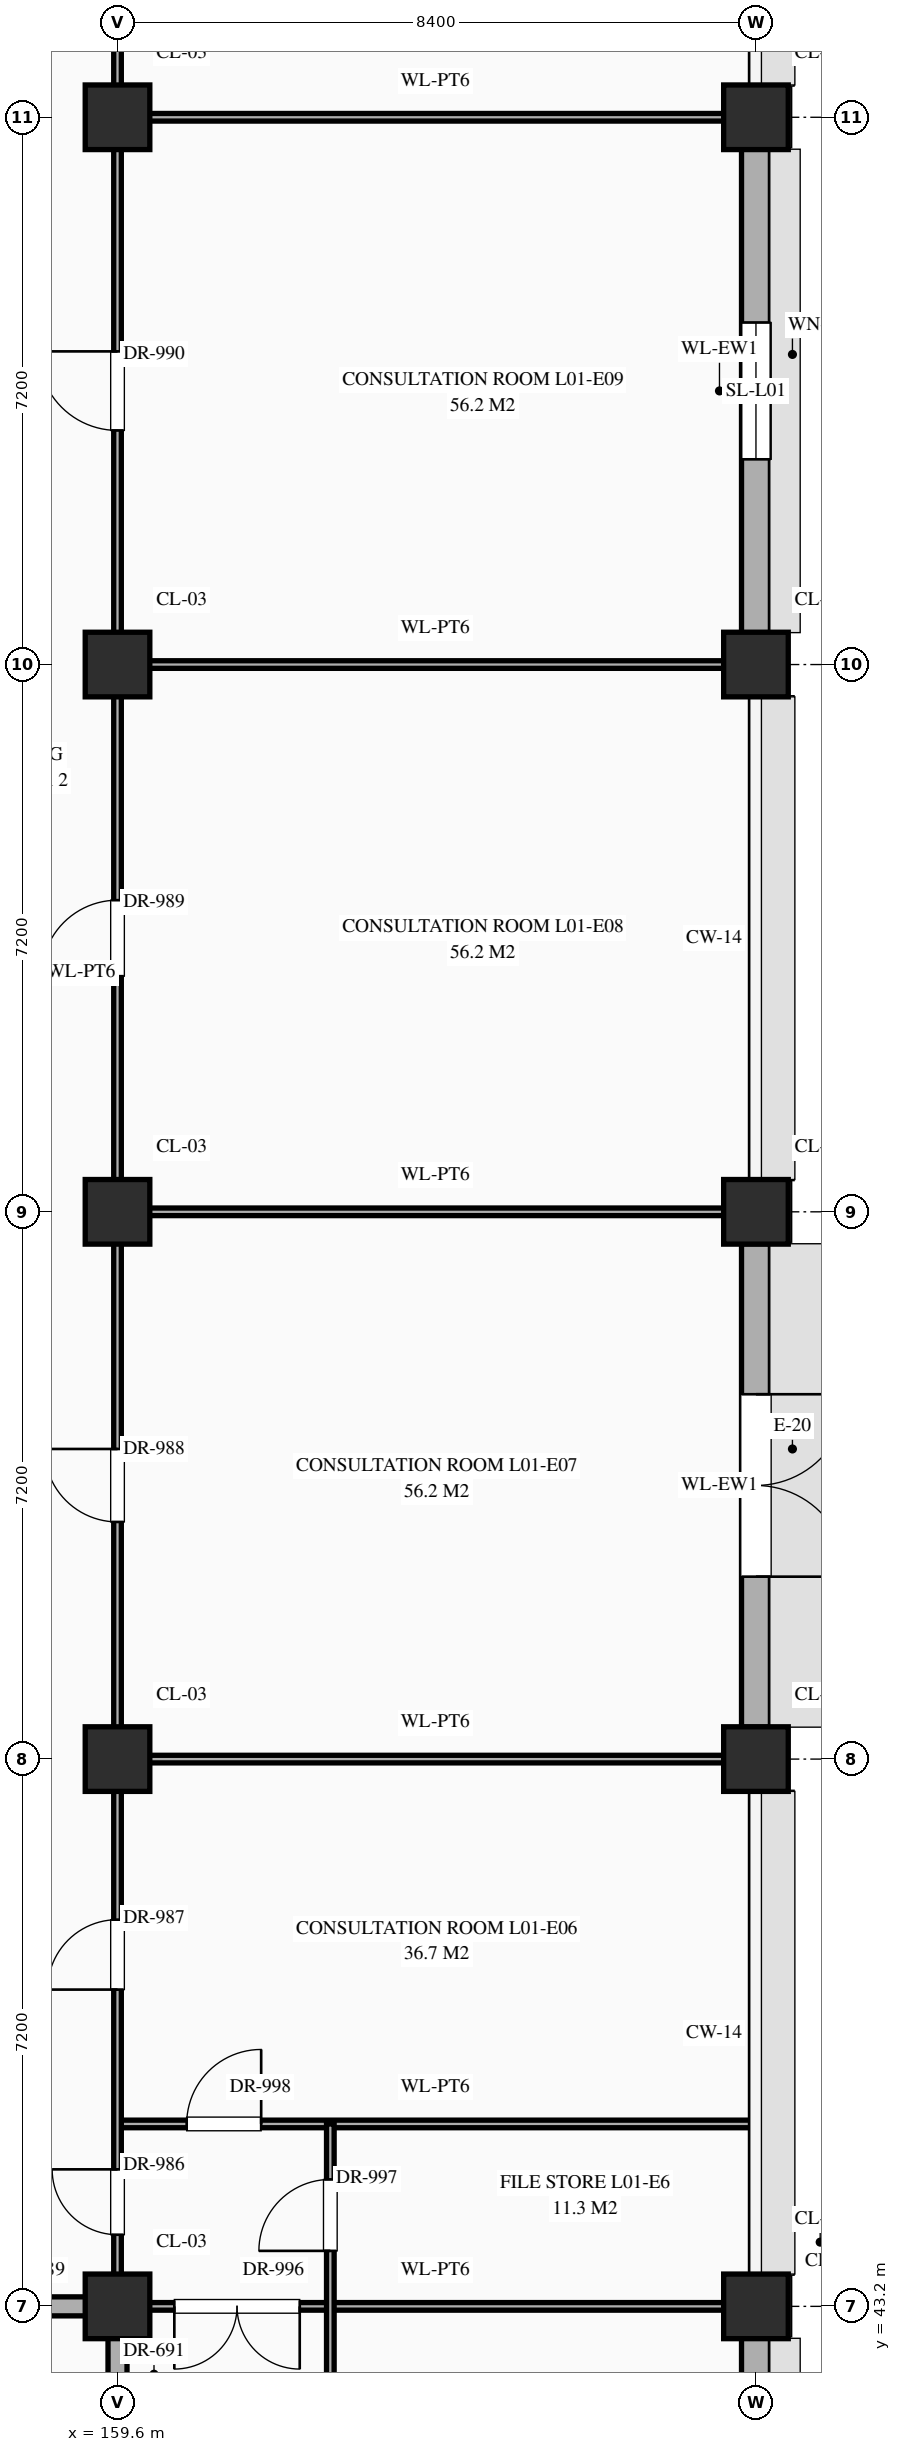
"""IFC4 building model, lengths in metres.
Left out: names, types, materials, properties, quantities, classifications, styles, units other than length and angle.
Written with IfcOpenShell. Run it as: python <this file> out.ifc"""

import sys

from ifc_helpers import new_model, si_unit, direction, frame, frame_2d, origin, origin_2d, place, context, subcontext, project, spatial, rectangle, extrude, element, fill, save


model = new_model("IFC4")
c1 = context("Model", 3, precision=1e-05, world=origin(), true_north=direction((0.0, 1.0)))
c2 = subcontext(c1, "Body", "Model", "MODEL_VIEW")
j1 = project(units=[si_unit("LENGTHUNIT", "METRE"), si_unit("PLANEANGLEUNIT", "RADIAN")], contexts=[c1])
p1 = place(None, origin())
s1 = spatial("IfcSite", under=j1, at=p1, CompositionType="ELEMENT")
p2 = place(p1, origin())
s2 = spatial("IfcBuilding", under=s1, at=p2, CompositionType="ELEMENT")
p3 = place(p2, origin())
s3 = spatial("IfcBuildingStorey", under=s2, at=p3, CompositionType="ELEMENT", Elevation=0.0)
for number, where, z_axis, x_axis in (
    (1, (159.6, 43.2, 0.0), (0.0, 0.0, 1.0), (1.0, 0.0, 0.0)),
    (2, (159.6, 50.4, 0.0), (0.0, 0.0, 1.0), (1.0, 0.0, 0.0)),
    (3, (159.6, 57.6, 0.0), (0.0, 0.0, 1.0), (1.0, 0.0, 0.0)),
    (4, (159.6, 64.8, 0.0), (0.0, 0.0, 1.0), (1.0, 0.0, 0.0)),
    (5, (159.6, 72.0, 0.0), (0.0, 0.0, 1.0), (1.0, 0.0, 0.0)),
    (6, (168.0, 43.2, 0.0), (0.0, 0.0, 1.0), (1.0, 0.0, 0.0)),
    (7, (168.0, 50.4, 0.0), (0.0, 0.0, 1.0), (1.0, 0.0, 0.0)),
    (8, (168.0, 57.6, 0.0), (0.0, 0.0, 1.0), (1.0, 0.0, 0.0)),
    (9, (168.0, 64.8, 0.0), (0.0, 0.0, 1.0), (1.0, 0.0, 0.0)),
    (10, (168.0, 72.0, 0.0), (0.0, 0.0, 1.0), (1.0, 0.0, 0.0)),
):
    element("IfcColumn", number, at=place(p3, frame(where, z_axis=z_axis, x_axis=x_axis)), inside=s3, PredefinedType="COLUMN", context=c2, shape_type="SweptSolid", body=[
        extrude(rectangle(XDim=0.85, YDim=0.85, at=origin_2d()), origin(), (0.0, 0.0, 1.0), 5.4),
    ])
p4 = place(p3, frame((168.0, 36.42, 0.0), z_axis=(0.0, 0.0, 1.0), x_axis=(0.0, 1.0, 0.0)))
e11 = element("IfcWall", 11, at=p4, inside=s3, PredefinedType="STANDARD", context=c2, shape_type="SweptSolid", body=[
    extrude(rectangle(XDim=6.36, YDim=0.38, at=frame_2d((3.18, 0.0))), origin(), (0.0, 0.0, 1.0), 4.47),
])
p5 = place(p4, frame((2.28, 0.0, 0.85)))
e12 = element("IfcOpeningElement", 12, at=p5, cuts=e11, PredefinedType="OPENING", context=c2, shape_type="SweptSolid", body=[
    extrude(rectangle(XDim=1.8, YDim=1.2, at=frame_2d((0.9, 0.6))), frame((0.0, 0.202, 0.0), z_axis=(0.0, -1.0, 0.0), x_axis=(1.0, 0.0, 0.0)), (0.0, 0.0, 1.0), 0.404),
])
p6 = place(p3, frame((168.0, 50.82, 0.0), z_axis=(0.0, 0.0, 1.0), x_axis=(0.0, 1.0, 0.0)))
e13 = element("IfcWall", 13, at=p6, inside=s3, PredefinedType="STANDARD", context=c2, shape_type="SweptSolid", body=[
    extrude(rectangle(XDim=6.36, YDim=0.38, at=frame_2d((3.18, 0.0))), origin(), (0.0, 0.0, 1.0), 4.47),
])
p7 = place(p6, frame((1.98, 0.0, 0.0)))
e14 = element("IfcOpeningElement", 14, at=p7, cuts=e13, PredefinedType="OPENING", context=c2, shape_type="SweptSolid", body=[
    extrude(rectangle(XDim=2.4, YDim=2.4, at=frame_2d((1.2, 1.2))), frame((0.0, 0.202, 0.0), z_axis=(0.0, -1.0, 0.0), x_axis=(1.0, 0.0, 0.0)), (0.0, 0.0, 1.0), 0.404),
])
p8 = place(p3, frame((168.0, 65.22, 0.0), z_axis=(0.0, 0.0, 1.0), x_axis=(0.0, 1.0, 0.0)))
e15 = element("IfcWall", 15, at=p8, inside=s3, PredefinedType="STANDARD", context=c2, shape_type="SweptSolid", body=[
    extrude(rectangle(XDim=6.36, YDim=0.38, at=frame_2d((3.18, 0.0))), origin(), (0.0, 0.0, 1.0), 4.47),
])
p9 = place(p8, frame((2.28, 0.0, 0.85)))
e16 = element("IfcOpeningElement", 16, at=p9, cuts=e15, PredefinedType="OPENING", context=c2, shape_type="SweptSolid", body=[
    extrude(rectangle(XDim=1.8, YDim=1.92, at=frame_2d((0.9, 0.96))), frame((0.0, 0.202, 0.0), z_axis=(0.0, -1.0, 0.0), x_axis=(1.0, 0.0, 0.0)), (0.0, 0.0, 1.0), 0.404),
])
p10 = place(p3, frame((151.24, 43.2, 0.0), z_axis=(0.0, 0.0, 1.0), x_axis=(1.0, 0.0, 0.0)))
e17 = element("IfcWall", 17, at=p10, inside=s3, PredefinedType="STANDARD", context=c2, shape_type="SweptSolid", body=[
    extrude(rectangle(XDim=8.36, YDim=0.25, at=frame_2d((4.18, 0.0))), origin(), (0.0, 0.0, 1.0), 4.27),
])
p11 = place(p10, frame((6.238, 0.0, 0.0)))
e18 = element("IfcOpeningElement", 18, at=p11, cuts=e17, PredefinedType="OPENING", context=c2, shape_type="SweptSolid", body=[
    extrude(rectangle(XDim=1.1, YDim=2.2, at=frame_2d((0.55, 1.1))), frame((0.0, 0.137, 0.0), z_axis=(0.0, -1.0, 0.0), x_axis=(1.0, 0.0, 0.0)), (0.0, 0.0, 1.0), 0.274),
])
p12 = place(p10, frame((1.933, 0.0, 0.0)))
e19 = element("IfcOpeningElement", 19, at=p12, cuts=e17, PredefinedType="OPENING", context=c2, shape_type="SweptSolid", body=[
    extrude(rectangle(XDim=2.0, YDim=2.4, at=frame_2d((1.0, 1.2))), frame((0.0, 0.137, 0.0), z_axis=(0.0, -1.0, 0.0), x_axis=(1.0, 0.0, 0.0)), (0.0, 0.0, 1.0), 0.274),
])
p13 = place(p3, frame((159.6, 43.2, 0.0), z_axis=(0.0, 0.0, 1.0), x_axis=(1.0, 0.0, 0.0)))
e20 = element("IfcWall", 20, at=p13, inside=s3, PredefinedType="STANDARD", context=c2, shape_type="SweptSolid", body=[
    extrude(rectangle(XDim=8.36, YDim=0.1, at=frame_2d((4.18, 0.0))), origin(), (0.0, 0.0, 1.0), 4.27),
])
p14 = place(p13, frame((0.748, 0.0, 0.0)))
e21 = element("IfcOpeningElement", 21, at=p14, cuts=e20, PredefinedType="OPENING", context=c2, shape_type="SweptSolid", body=[
    extrude(rectangle(XDim=1.65, YDim=2.4, at=frame_2d((0.825, 1.2))), frame((0.0, 0.062, 0.0), z_axis=(0.0, -1.0, 0.0), x_axis=(1.0, 0.0, 0.0)), (0.0, 0.0, 1.0), 0.124),
])
p15 = place(p3, frame((159.6, 45.6, 0.0), z_axis=(0.0, 0.0, 1.0), x_axis=(1.0, 0.0, 0.0)))
e22 = element("IfcWall", 22, at=p15, inside=s3, PredefinedType="STANDARD", context=c2, shape_type="SweptSolid", body=[
    extrude(rectangle(XDim=8.36, YDim=0.1, at=frame_2d((4.18, 0.0))), origin(), (0.0, 0.0, 1.0), 5.12),
])
p16 = place(p15, frame((0.91, 0.0, 0.0)))
e23 = element("IfcOpeningElement", 23, at=p16, cuts=e22, PredefinedType="OPENING", context=c2, shape_type="SweptSolid", body=[
    extrude(rectangle(XDim=0.98, YDim=2.35, at=frame_2d((0.49, 1.175))), frame((0.0, 0.062, 0.0), z_axis=(0.0, -1.0, 0.0), x_axis=(1.0, 0.0, 0.0)), (0.0, 0.0, 1.0), 0.124),
])
for number, where, z_axis, x_axis in (
    (24, (159.6, 50.4, 0.0), (0.0, 0.0, 1.0), (1.0, 0.0, 0.0)),
    (25, (159.6, 57.6, 0.0), (0.0, 0.0, 1.0), (1.0, 0.0, 0.0)),
    (26, (159.6, 64.8, 0.0), (0.0, 0.0, 1.0), (1.0, 0.0, 0.0)),
    (27, (159.6, 72.0, 0.0), (0.0, 0.0, 1.0), (1.0, 0.0, 0.0)),
):
    element("IfcWall", number, at=place(p3, frame(where, z_axis=z_axis, x_axis=x_axis)), inside=s3, PredefinedType="STANDARD", context=c2, shape_type="SweptSolid", body=[
        extrude(rectangle(XDim=8.36, YDim=0.1, at=frame_2d((4.18, 0.0))), origin(), (0.0, 0.0, 1.0), 4.27),
    ])
p17 = place(p3, frame((159.6, 40.8, 0.0), z_axis=(0.0, 0.0, 1.0), x_axis=(0.0, 1.0, 0.0)))
e28 = element("IfcWall", 28, at=p17, inside=s3, PredefinedType="STANDARD", context=c2, shape_type="SweptSolid", body=[
    extrude(rectangle(XDim=2.4, YDim=0.25, at=frame_2d((1.2, 0.0))), origin(), (0.0, 0.0, 1.0), 4.37),
])
p18 = place(p17, frame((0.552, 0.0, 0.0)))
e29 = element("IfcOpeningElement", 29, at=p18, cuts=e28, PredefinedType="OPENING", context=c2, shape_type="SweptSolid", body=[
    extrude(rectangle(XDim=0.95, YDim=2.15, at=frame_2d((0.475, 1.075))), frame((0.0, 0.137, 0.0), z_axis=(0.0, -1.0, 0.0), x_axis=(1.0, 0.0, 0.0)), (0.0, 0.0, 1.0), 0.274),
])
p19 = place(p3, frame((159.6, 43.2, 0.0), z_axis=(0.0, 0.0, 1.0), x_axis=(0.0, 1.0, 0.0)))
e30 = element("IfcWall", 30, at=p19, inside=s3, PredefinedType="STANDARD", context=c2, shape_type="SweptSolid", body=[
    extrude(rectangle(XDim=40.8, YDim=0.1, at=frame_2d((20.4, 0.0))), origin(), (0.0, 0.0, 1.0), 4.37),
])
p20 = place(p19, frame((37.933, 0.0, 0.0)))
e31 = element("IfcOpeningElement", 31, at=p20, cuts=e30, PredefinedType="OPENING", context=c2, shape_type="SweptSolid", body=[
    extrude(rectangle(XDim=1.28, YDim=2.35, at=frame_2d((0.64, 1.175))), frame((0.0, 0.062, 0.0), z_axis=(0.0, -1.0, 0.0), x_axis=(1.0, 0.0, 0.0)), (0.0, 0.0, 1.0), 0.124),
])
p21 = place(p19, frame((0.942, 0.0, 0.0)))
e32 = element("IfcOpeningElement", 32, at=p21, cuts=e30, PredefinedType="OPENING", context=c2, shape_type="SweptSolid", body=[
    extrude(rectangle(XDim=0.86, YDim=2.1, at=frame_2d((0.43, 1.05))), frame((0.0, 0.062, 0.0), z_axis=(0.0, -1.0, 0.0), x_axis=(1.0, 0.0, 0.0)), (0.0, 0.0, 1.0), 0.124),
])
p22 = place(p19, frame((4.167, 0.0, 0.0)))
e33 = element("IfcOpeningElement", 33, at=p22, cuts=e30, PredefinedType="OPENING", context=c2, shape_type="SweptSolid", body=[
    extrude(rectangle(XDim=0.92, YDim=2.15, at=frame_2d((0.46, 1.075))), frame((0.0, 0.062, 0.0), z_axis=(0.0, -1.0, 0.0), x_axis=(1.0, 0.0, 0.0)), (0.0, 0.0, 1.0), 0.124),
])
p23 = place(p19, frame((10.32, 0.0, 0.0)))
e34 = element("IfcOpeningElement", 34, at=p23, cuts=e30, PredefinedType="OPENING", context=c2, shape_type="SweptSolid", body=[
    extrude(rectangle(XDim=0.96, YDim=2.2, at=frame_2d((0.48, 1.1))), frame((0.0, 0.062, 0.0), z_axis=(0.0, -1.0, 0.0), x_axis=(1.0, 0.0, 0.0)), (0.0, 0.0, 1.0), 0.124),
])
p24 = place(p19, frame((17.5, 0.0, 0.0)))
e35 = element("IfcOpeningElement", 35, at=p24, cuts=e30, PredefinedType="OPENING", context=c2, shape_type="SweptSolid", body=[
    extrude(rectangle(XDim=1.0, YDim=2.25, at=frame_2d((0.5, 1.125))), frame((0.0, 0.062, 0.0), z_axis=(0.0, -1.0, 0.0), x_axis=(1.0, 0.0, 0.0)), (0.0, 0.0, 1.0), 0.124),
])
p25 = place(p19, frame((24.68, 0.0, 0.0)))
e36 = element("IfcOpeningElement", 36, at=p25, cuts=e30, PredefinedType="OPENING", context=c2, shape_type="SweptSolid", body=[
    extrude(rectangle(XDim=1.04, YDim=2.2, at=frame_2d((0.52, 1.1))), frame((0.0, 0.062, 0.0), z_axis=(0.0, -1.0, 0.0), x_axis=(1.0, 0.0, 0.0)), (0.0, 0.0, 1.0), 0.124),
])
p26 = place(p19, frame((31.86, 0.0, 0.0)))
e37 = element("IfcOpeningElement", 37, at=p26, cuts=e30, PredefinedType="OPENING", context=c2, shape_type="SweptSolid", body=[
    extrude(rectangle(XDim=1.08, YDim=2.25, at=frame_2d((0.54, 1.125))), frame((0.0, 0.062, 0.0), z_axis=(0.0, -1.0, 0.0), x_axis=(1.0, 0.0, 0.0)), (0.0, 0.0, 1.0), 0.124),
])
p27 = place(p3, frame((162.4, 33.6, 0.0), z_axis=(0.0, 0.0, 1.0), x_axis=(0.0, 1.0, 0.0)))
e38 = element("IfcWall", 38, at=p27, inside=s3, PredefinedType="STANDARD", context=c2, shape_type="SweptSolid", body=[
    extrude(rectangle(XDim=12.0, YDim=0.1, at=frame_2d((6.0, 0.0))), origin(), (0.0, 0.0, 1.0), 5.12),
])
p28 = place(p27, frame((0.62, 0.0, 0.0)))
e39 = element("IfcOpeningElement", 39, at=p28, cuts=e38, PredefinedType="OPENING", context=c2, shape_type="SweptSolid", body=[
    extrude(rectangle(XDim=1.16, YDim=2.3, at=frame_2d((0.58, 1.15))), frame((0.0, 0.062, 0.0), z_axis=(0.0, -1.0, 0.0), x_axis=(1.0, 0.0, 0.0)), (0.0, 0.0, 1.0), 0.124),
])
p29 = place(p27, frame((5.38, 0.0, 0.0)))
e40 = element("IfcOpeningElement", 40, at=p29, cuts=e38, PredefinedType="OPENING", context=c2, shape_type="SweptSolid", body=[
    extrude(rectangle(XDim=1.24, YDim=2.3, at=frame_2d((0.62, 1.15))), frame((0.0, 0.062, 0.0), z_axis=(0.0, -1.0, 0.0), x_axis=(1.0, 0.0, 0.0)), (0.0, 0.0, 1.0), 0.124),
])
p30 = place(p27, frame((10.33, 0.0, 0.0)))
e41 = element("IfcOpeningElement", 41, at=p30, cuts=e38, PredefinedType="OPENING", context=c2, shape_type="SweptSolid", body=[
    extrude(rectangle(XDim=0.94, YDim=2.3, at=frame_2d((0.47, 1.15))), frame((0.0, 0.062, 0.0), z_axis=(0.0, -1.0, 0.0), x_axis=(1.0, 0.0, 0.0)), (0.0, 0.0, 1.0), 0.124),
])
p31 = place(p7, frame((2.4, 0.0, 0.0), z_axis=(0.0, 0.0, 1.0), x_axis=(-1.0, 0.0, 0.0)))
e42 = element("IfcDoor", 42, at=p31, inside=s3, OperationType="DOUBLE_DOOR_SINGLE_SWING", PredefinedType="DOOR", context=c2, shape_type="SweptSolid", body=[
    extrude(rectangle(XDim=2.4, YDim=2.4, at=frame_2d((1.2, 1.2))), frame((0.0, 0.025, 0.0), z_axis=(0.0, -1.0, 0.0), x_axis=(1.0, 0.0, 0.0)), (0.0, 0.0, 1.0), 0.05),
])
fill(e14, e42)
p32 = place(p9, origin())
e43 = element("IfcWindow", 43, at=p32, inside=s3, PartitioningType="SINGLE_PANEL", PredefinedType="WINDOW", context=c2, shape_type="SweptSolid", body=[
    extrude(rectangle(XDim=1.8, YDim=1.92, at=frame_2d((0.9, 0.96))), frame((0.0, 0.03, 0.0), z_axis=(0.0, -1.0, 0.0), x_axis=(1.0, 0.0, 0.0)), (0.0, 0.0, 1.0), 0.06),
])
fill(e16, e43)
p33 = place(p21, origin())
e44 = element("IfcDoor", 44, at=p33, inside=s3, OperationType="SINGLE_SWING_RIGHT", PredefinedType="DOOR", context=c2, shape_type="SweptSolid", body=[
    extrude(rectangle(XDim=0.86, YDim=2.1, at=frame_2d((0.43, 1.05))), frame((0.0, 0.025, 0.0), z_axis=(0.0, -1.0, 0.0), x_axis=(1.0, 0.0, 0.0)), (0.0, 0.0, 1.0), 0.05),
])
fill(e32, e44)
p34 = place(p22, origin())
e45 = element("IfcDoor", 45, at=p34, inside=s3, OperationType="SINGLE_SWING_LEFT", PredefinedType="DOOR", context=c2, shape_type="SweptSolid", body=[
    extrude(rectangle(XDim=0.92, YDim=2.15, at=frame_2d((0.46, 1.075))), frame((0.0, 0.025, 0.0), z_axis=(0.0, -1.0, 0.0), x_axis=(1.0, 0.0, 0.0)), (0.0, 0.0, 1.0), 0.05),
])
fill(e33, e45)
p35 = place(p23, origin())
e46 = element("IfcDoor", 46, at=p35, inside=s3, OperationType="SINGLE_SWING_RIGHT", PredefinedType="DOOR", context=c2, shape_type="SweptSolid", body=[
    extrude(rectangle(XDim=0.96, YDim=2.2, at=frame_2d((0.48, 1.1))), frame((0.0, 0.025, 0.0), z_axis=(0.0, -1.0, 0.0), x_axis=(1.0, 0.0, 0.0)), (0.0, 0.0, 1.0), 0.05),
])
fill(e34, e46)
p36 = place(p24, origin())
e47 = element("IfcDoor", 47, at=p36, inside=s3, OperationType="SINGLE_SWING_LEFT", PredefinedType="DOOR", context=c2, shape_type="SweptSolid", body=[
    extrude(rectangle(XDim=1.0, YDim=2.25, at=frame_2d((0.5, 1.125))), frame((0.0, 0.025, 0.0), z_axis=(0.0, -1.0, 0.0), x_axis=(1.0, 0.0, 0.0)), (0.0, 0.0, 1.0), 0.05),
])
fill(e35, e47)
p37 = place(p25, origin())
e48 = element("IfcDoor", 48, at=p37, inside=s3, OperationType="SINGLE_SWING_RIGHT", PredefinedType="DOOR", context=c2, shape_type="SweptSolid", body=[
    extrude(rectangle(XDim=1.04, YDim=2.2, at=frame_2d((0.52, 1.1))), frame((0.0, 0.025, 0.0), z_axis=(0.0, -1.0, 0.0), x_axis=(1.0, 0.0, 0.0)), (0.0, 0.0, 1.0), 0.05),
])
fill(e36, e48)
p38 = place(p14, frame((1.65, 0.0, 0.0), z_axis=(0.0, 0.0, 1.0), x_axis=(-1.0, 0.0, 0.0)))
e49 = element("IfcDoor", 49, at=p38, inside=s3, OperationType="DOUBLE_DOOR_SINGLE_SWING", PredefinedType="DOOR", context=c2, shape_type="SweptSolid", body=[
    extrude(rectangle(XDim=1.65, YDim=2.4, at=frame_2d((0.825, 1.2))), frame((0.0, 0.025, 0.0), z_axis=(0.0, -1.0, 0.0), x_axis=(1.0, 0.0, 0.0)), (0.0, 0.0, 1.0), 0.05),
])
fill(e21, e49)
p39 = place(p30, origin())
e50 = element("IfcDoor", 50, at=p39, inside=s3, OperationType="SINGLE_SWING_LEFT", PredefinedType="DOOR", context=c2, shape_type="SweptSolid", body=[
    extrude(rectangle(XDim=0.94, YDim=2.3, at=frame_2d((0.47, 1.15))), frame((0.0, 0.025, 0.0), z_axis=(0.0, -1.0, 0.0), x_axis=(1.0, 0.0, 0.0)), (0.0, 0.0, 1.0), 0.05),
])
fill(e41, e50)
p40 = place(p16, origin())
e51 = element("IfcDoor", 51, at=p40, inside=s3, OperationType="SINGLE_SWING_RIGHT", PredefinedType="DOOR", context=c2, shape_type="SweptSolid", body=[
    extrude(rectangle(XDim=0.98, YDim=2.35, at=frame_2d((0.49, 1.175))), frame((0.0, 0.025, 0.0), z_axis=(0.0, -1.0, 0.0), x_axis=(1.0, 0.0, 0.0)), (0.0, 0.0, 1.0), 0.05),
])
fill(e23, e51)
save(model, sys.argv[1])
